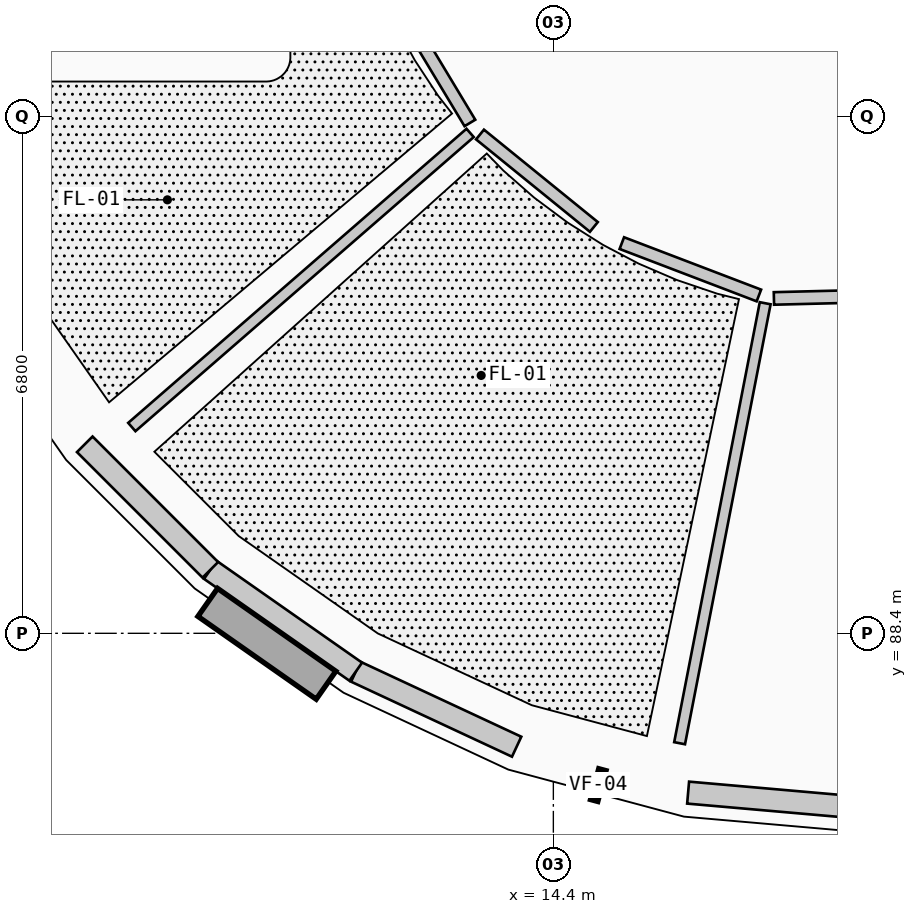
"""IFC4 building model, lengths in metres.
Left out: names, types, materials, properties, quantities, classifications, styles, units other than length and angle.
Written with IfcOpenShell. Run it as: python <this file> out.ifc"""

import sys

from ifc_helpers import new_model, si_unit, direction, frame, frame_2d, origin, origin_2d, place, context, subcontext, project, spatial, rectangle, extrude, element, fill, save


model = new_model("IFC4")
c1 = context("Model", 3, precision=1e-05, world=origin(), true_north=direction((0.0, 1.0)))
c2 = subcontext(c1, "Body", "Model", "MODEL_VIEW")
j1 = project(units=[si_unit("LENGTHUNIT", "METRE"), si_unit("PLANEANGLEUNIT", "RADIAN")], contexts=[c1])
p1 = place(None, origin())
s1 = spatial("IfcSite", under=j1, at=p1, CompositionType="ELEMENT")
p2 = place(p1, origin())
s2 = spatial("IfcBuilding", under=s1, at=p2, CompositionType="ELEMENT")
p3 = place(p2, frame((0.0, 0.0, 4.55)))
s3 = spatial("IfcBuildingStorey", under=s2, at=p3, CompositionType="ELEMENT", Elevation=4.55)
for number, where, z_axis, x_axis in (
    (1, (8.633, 91.221, 0.0), (0.0, 0.0, 1.0), (1.0, 0.0, 0.0)),
    (2, (12.06, 88.346, 0.0), (0.0, 0.0, 1.0), (1.0, 0.0, 0.0)),
    (3, (16.263, 86.816, 0.0), (0.0, 0.0, 1.0), (1.0, 0.0, 0.0)),
    (4, (15.1, 93.611, 0.0), (0.0, 0.0, 1.0), (1.0, 0.0, 0.0)),
):
    element("IfcColumn", number, at=place(p3, frame(where, z_axis=z_axis, x_axis=x_axis)), inside=s3, PredefinedType="COLUMN", context=c2, shape_type="SweptSolid", body=[
        extrude(rectangle(XDim=0.42, YDim=0.42, at=origin_2d()), origin(), (0.0, 0.0, 1.0), 4.2),
    ])
p4 = place(p3, frame((18.5, 86.1, 0.0), z_axis=(0.0, 0.0, 1.0), x_axis=(-0.996184295282, 0.087274565792, 0.0)))
e5 = element("IfcWall", 5, at=p4, inside=s3, PredefinedType="ELEMENTEDWALL", context=c2, shape_type="SweptSolid", body=[
    extrude(rectangle(XDim=2.336, YDim=0.29, at=frame_2d((1.168, 0.0))), origin(), (0.0, 0.0, 1.0), 3.309),
])
p5 = place(p4, frame((0.543, 0.0, 0.85)))
e6 = element("IfcOpeningElement", 6, at=p5, cuts=e5, PredefinedType="OPENING", context=c2, shape_type="SweptSolid", body=[
    extrude(rectangle(XDim=1.25, YDim=1.5, at=frame_2d((0.625, 0.75))), frame((0.0, 0.155, 0.0), z_axis=(0.0, -1.0, 0.0), x_axis=(1.0, 0.0, 0.0)), (0.0, 0.0, 1.0), 0.31),
])
p6 = place(p3, frame((13.917, 86.908, 0.0), z_axis=(0.0, 0.0, 1.0), x_axis=(-0.906321946979, 0.422587894318, 0.0)))
e7 = element("IfcWall", 7, at=p6, inside=s3, PredefinedType="ELEMENTEDWALL", context=c2, shape_type="SweptSolid", body=[
    extrude(rectangle(XDim=2.336, YDim=0.29, at=frame_2d((1.168, 0.0))), origin(), (0.0, 0.0, 1.0), 3.309),
])
p7 = place(p6, frame((0.543, 0.0, 0.85)))
e8 = element("IfcOpeningElement", 8, at=p7, cuts=e7, PredefinedType="OPENING", context=c2, shape_type="SweptSolid", body=[
    extrude(rectangle(XDim=1.25, YDim=1.8, at=frame_2d((0.625, 0.9))), frame((0.0, 0.155, 0.0), z_axis=(0.0, -1.0, 0.0), x_axis=(1.0, 0.0, 0.0)), (0.0, 0.0, 1.0), 0.31),
])
p8 = place(p3, frame((11.8, 87.895, 0.0), z_axis=(0.0, 0.0, 1.0), x_axis=(-0.819045278347, 0.573728883722, 0.0)))
e9 = element("IfcWall", 9, at=p8, inside=s3, PredefinedType="ELEMENTEDWALL", context=c2, shape_type="SweptSolid", body=[
    extrude(rectangle(XDim=2.336, YDim=0.29, at=frame_2d((1.168, 0.0))), origin(), (0.0, 0.0, 1.0), 3.309),
])
p9 = place(p8, frame((0.543, 0.0, 0.85)))
e10 = element("IfcOpeningElement", 10, at=p9, cuts=e9, PredefinedType="OPENING", context=c2, shape_type="SweptSolid", body=[
    extrude(rectangle(XDim=1.25, YDim=2.1, at=frame_2d((0.625, 1.05))), frame((0.0, 0.155, 0.0), z_axis=(0.0, -1.0, 0.0), x_axis=(1.0, 0.0, 0.0)), (0.0, 0.0, 1.0), 0.31),
])
p10 = place(p3, frame((9.887, 89.235, 0.0), z_axis=(0.0, 0.0, 1.0), x_axis=(-0.707106781187, 0.707106781187, 0.0)))
e11 = element("IfcWall", 11, at=p10, inside=s3, PredefinedType="ELEMENTEDWALL", context=c2, shape_type="SweptSolid", body=[
    extrude(rectangle(XDim=2.336, YDim=0.29, at=frame_2d((1.168, 0.0))), origin(), (0.0, 0.0, 1.0), 3.309),
])
p11 = place(p10, frame((0.528, 0.0, 0.85)))
e12 = element("IfcOpeningElement", 12, at=p11, cuts=e11, PredefinedType="OPENING", context=c2, shape_type="SweptSolid", body=[
    extrude(rectangle(XDim=1.28, YDim=1.65, at=frame_2d((0.64, 0.825))), frame((0.0, 0.155, 0.0), z_axis=(0.0, -1.0, 0.0), x_axis=(1.0, 0.0, 0.0)), (0.0, 0.0, 1.0), 0.31),
])
p12 = place(p3, frame((13.305, 94.984, 0.0), z_axis=(0.0, 0.0, 1.0), x_axis=(-0.754647404393, -0.656130547256, 0.0)))
e13 = element("IfcWall", 13, at=p12, inside=s3, PredefinedType="PARTITIONING", context=c2, shape_type="SweptSolid", body=[
    extrude(rectangle(XDim=5.898, YDim=0.145, at=frame_2d((2.949, 0.0))), origin(), (0.0, 0.0, 1.0), 3.284),
])
p13 = place(p3, frame((17.187, 92.743, 0.0), z_axis=(0.0, 0.0, 1.0), x_axis=(-0.190930602481, -0.981603537604, 0.0)))
e14 = element("IfcWall", 14, at=p13, inside=s3, PredefinedType="PARTITIONING", context=c2, shape_type="SweptSolid", body=[
    extrude(rectangle(XDim=5.897, YDim=0.145, at=frame_2d((2.949, 0.0))), origin(), (0.0, 0.0, 1.0), 3.284),
])
p14 = place(p3, frame((12.45, 96.53, 0.0), z_axis=(0.0, 0.0, 1.0), x_axis=(0.515842762515, -0.856683281243, 0.0)))
e15 = element("IfcWall", 15, at=p14, inside=s3, PredefinedType="PARTITIONING", context=c2, shape_type="SweptSolid", body=[
    extrude(rectangle(XDim=1.652, YDim=0.165, at=frame_2d((0.826, 0.0))), origin(), (0.0, 0.0, 1.0), 3.284),
])
p15 = place(p14, frame((0.321, 0.0, 0.0)))
e16 = element("IfcOpeningElement", 16, at=p15, cuts=e15, PredefinedType="OPENING", context=c2, shape_type="SweptSolid", body=[
    extrude(rectangle(XDim=1.01, YDim=2.15, at=frame_2d((0.505, 1.075))), frame((0.0, 0.093, 0.0), z_axis=(0.0, -1.0, 0.0), x_axis=(1.0, 0.0, 0.0)), (0.0, 0.0, 1.0), 0.185),
])
p16 = place(p3, frame((13.435, 94.963, 0.0), z_axis=(0.0, 0.0, 1.0), x_axis=(0.776454505021, -0.63017331079, 0.0)))
e17 = element("IfcWall", 17, at=p16, inside=s3, PredefinedType="PARTITIONING", context=c2, shape_type="SweptSolid", body=[
    extrude(rectangle(XDim=1.929, YDim=0.165, at=frame_2d((0.965, 0.0))), origin(), (0.0, 0.0, 1.0), 3.284),
])
p17 = place(p16, frame((0.45, 0.0, 0.0)))
e18 = element("IfcOpeningElement", 18, at=p17, cuts=e17, PredefinedType="OPENING", context=c2, shape_type="SweptSolid", body=[
    extrude(rectangle(XDim=1.03, YDim=2.18, at=frame_2d((0.515, 1.09))), frame((0.0, 0.093, 0.0), z_axis=(0.0, -1.0, 0.0), x_axis=(1.0, 0.0, 0.0)), (0.0, 0.0, 1.0), 0.185),
])
p18 = place(p3, frame((15.301, 93.534, 0.0), z_axis=(0.0, 0.0, 1.0), x_axis=(0.934122555003, -0.356952450944, 0.0)))
e19 = element("IfcWall", 19, at=p18, inside=s3, PredefinedType="PARTITIONING", context=c2, shape_type="SweptSolid", body=[
    extrude(rectangle(XDim=1.93, YDim=0.165, at=frame_2d((0.965, 0.0))), origin(), (0.0, 0.0, 1.0), 3.284),
])
p19 = place(p3, frame((17.302, 92.806, 0.0), z_axis=(0.0, 0.0, 1.0), x_axis=(0.999688838374, 0.024944466912, 0.0)))
e20 = element("IfcWall", 20, at=p19, inside=s3, PredefinedType="PARTITIONING", context=c2, shape_type="SweptSolid", body=[
    extrude(rectangle(XDim=2.173, YDim=0.165, at=frame_2d((1.086, 0.0))), origin(), (0.0, 0.0, 1.0), 3.284),
])
p20 = place(p19, frame((0.552, 0.0, 0.0)))
e21 = element("IfcOpeningElement", 21, at=p20, cuts=e20, PredefinedType="OPENING", context=c2, shape_type="SweptSolid", body=[
    extrude(rectangle(XDim=1.07, YDim=2.2, at=frame_2d((0.535, 1.1))), frame((0.0, 0.093, 0.0), z_axis=(0.0, -1.0, 0.0), x_axis=(1.0, 0.0, 0.0)), (0.0, 0.0, 1.0), 0.185),
])
p21 = place(p5, origin())
e22 = element("IfcWindow", 22, at=p21, inside=s3, PartitioningType="SINGLE_PANEL", PredefinedType="WINDOW", context=c2, shape_type="SweptSolid", body=[
    extrude(rectangle(XDim=1.25, YDim=1.5, at=frame_2d((0.625, 0.75))), frame((0.0, 0.03, 0.0), z_axis=(0.0, -1.0, 0.0), x_axis=(1.0, 0.0, 0.0)), (0.0, 0.0, 1.0), 0.06),
])
fill(e6, e22)
p22 = place(p7, origin())
e23 = element("IfcWindow", 23, at=p22, inside=s3, PartitioningType="SINGLE_PANEL", PredefinedType="WINDOW", context=c2, shape_type="SweptSolid", body=[
    extrude(rectangle(XDim=1.25, YDim=1.8, at=frame_2d((0.625, 0.9))), frame((0.0, 0.03, 0.0), z_axis=(0.0, -1.0, 0.0), x_axis=(1.0, 0.0, 0.0)), (0.0, 0.0, 1.0), 0.06),
])
fill(e8, e23)
p23 = place(p9, origin())
e24 = element("IfcWindow", 24, at=p23, inside=s3, PartitioningType="SINGLE_PANEL", PredefinedType="WINDOW", context=c2, shape_type="SweptSolid", body=[
    extrude(rectangle(XDim=1.25, YDim=2.1, at=frame_2d((0.625, 1.05))), frame((0.0, 0.03, 0.0), z_axis=(0.0, -1.0, 0.0), x_axis=(1.0, 0.0, 0.0)), (0.0, 0.0, 1.0), 0.06),
])
fill(e10, e24)
p24 = place(p11, origin())
e25 = element("IfcWindow", 25, at=p24, inside=s3, PartitioningType="SINGLE_PANEL", PredefinedType="WINDOW", context=c2, shape_type="SweptSolid", body=[
    extrude(rectangle(XDim=1.28, YDim=1.65, at=frame_2d((0.64, 0.825))), frame((0.0, 0.03, 0.0), z_axis=(0.0, -1.0, 0.0), x_axis=(1.0, 0.0, 0.0)), (0.0, 0.0, 1.0), 0.06),
])
fill(e12, e25)
p25 = place(p15, origin())
e26 = element("IfcDoor", 26, at=p25, inside=s3, OperationType="SINGLE_SWING_LEFT", PredefinedType="DOOR", context=c2, shape_type="SweptSolid", body=[
    extrude(rectangle(XDim=1.01, YDim=2.15, at=frame_2d((0.505, 1.075))), frame((0.0, 0.025, 0.0), z_axis=(0.0, -1.0, 0.0), x_axis=(1.0, 0.0, 0.0)), (0.0, 0.0, 1.0), 0.05),
])
fill(e16, e26)
p26 = place(p17, origin())
e27 = element("IfcDoor", 27, at=p26, inside=s3, OperationType="SINGLE_SWING_RIGHT", PredefinedType="DOOR", context=c2, shape_type="SweptSolid", body=[
    extrude(rectangle(XDim=1.03, YDim=2.18, at=frame_2d((0.515, 1.09))), frame((0.0, 0.025, 0.0), z_axis=(0.0, -1.0, 0.0), x_axis=(1.0, 0.0, 0.0)), (0.0, 0.0, 1.0), 0.05),
])
fill(e18, e27)
p27 = place(p20, origin())
e28 = element("IfcDoor", 28, at=p27, inside=s3, OperationType="SINGLE_SWING_LEFT", PredefinedType="DOOR", context=c2, shape_type="SweptSolid", body=[
    extrude(rectangle(XDim=1.07, YDim=2.2, at=frame_2d((0.535, 1.1))), frame((0.0, 0.025, 0.0), z_axis=(0.0, -1.0, 0.0), x_axis=(1.0, 0.0, 0.0)), (0.0, 0.0, 1.0), 0.05),
])
fill(e21, e28)
save(model, sys.argv[1])
